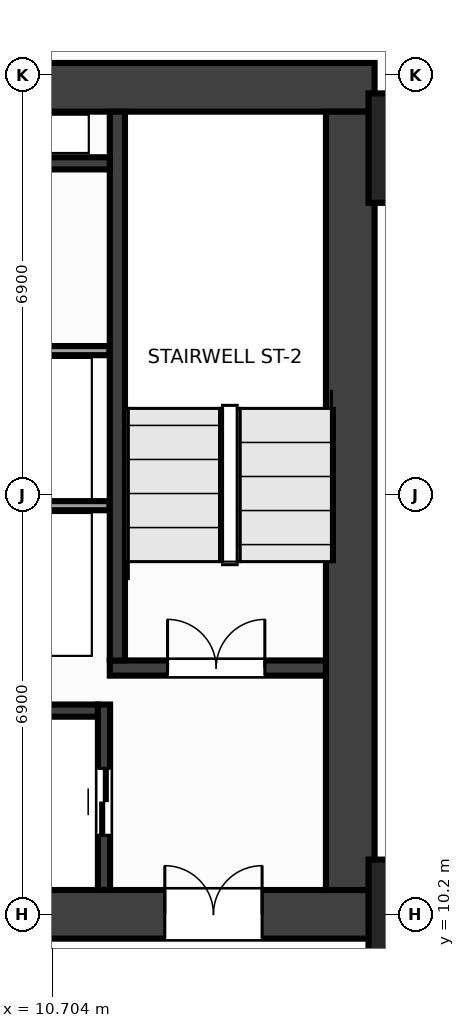
"""IFC4 building model, lengths in metres.
Left out: names, types, materials, properties, quantities, classifications, styles, units other than length and angle.
Written with IfcOpenShell. Run it as: python <this file> out.ifc"""

import sys

from ifc_helpers import new_model, si_unit, direction, frame, frame_2d, origin, origin_2d, place, context, subcontext, project, spatial, rectangle, extrude, source, transform, mapped, element, fill, save


model = new_model("IFC4")
c1 = context("Model", 3, precision=1e-05, world=origin(), true_north=direction((0.0, 1.0)))
c2 = subcontext(c1, "Body", "Model", "MODEL_VIEW")
j1 = project(units=[si_unit("LENGTHUNIT", "METRE"), si_unit("PLANEANGLEUNIT", "RADIAN")], contexts=[c1])
p1 = place(None, origin())
s1 = spatial("IfcSite", under=j1, at=p1, CompositionType="ELEMENT")
p2 = place(p1, origin())
s2 = spatial("IfcBuilding", under=s1, at=p2, CompositionType="ELEMENT")
p3 = place(p2, frame((0.0, 0.0, 41.6)))
s3 = spatial("IfcBuildingStorey", under=s2, at=p3, CompositionType="ELEMENT", Elevation=41.6)
m1 = source(origin(), c2, "Body", "SweptSolid", [
    extrude(rectangle(XDim=32.0, YDim=0.8, at=frame_2d((16.0, 0.0))), origin(), (0.0, 0.0, 1.0), 3.6),
])
p4 = place(p3, frame((-16.0, 23.8, 0.0), z_axis=(0.0, 0.0, 1.0), x_axis=(1.0, 0.0, 0.0)))
e1 = element("IfcWall", 1, at=p4, inside=s3, PredefinedType="SHEAR", context=c2, shape_type="MappedRepresentation", body=[
    mapped(m1, transform((0.0, 0.0, 0.0), x_axis=(1.0, 0.0, 0.0), y_axis=(0.0, 1.0, 0.0), z_axis=(0.0, 0.0, 1.0), scale=1.0)),
])
p5 = place(p3, frame((-16.0, 10.2, 0.0), z_axis=(0.0, 0.0, 1.0), x_axis=(1.0, 0.0, 0.0)))
e2 = element("IfcWall", 2, at=p5, inside=s3, PredefinedType="SHEAR", context=c2, shape_type="MappedRepresentation", body=[
    mapped(m1, transform((0.0, 0.0, 0.0), x_axis=(1.0, 0.0, 0.0), y_axis=(0.0, 1.0, 0.0), z_axis=(0.0, 0.0, 1.0), scale=1.0)),
])
p6 = place(p5, frame((1.85, 0.0, 0.0)))
e3 = element("IfcOpeningElement", 3, at=p6, cuts=e2, PredefinedType="OPENING", context=c2, shape_type="SweptSolid", body=[
    extrude(rectangle(XDim=1.6, YDim=2.15, at=frame_2d((0.8, 1.075))), frame((0.0, 0.412, 0.0), z_axis=(0.0, -1.0, 0.0), x_axis=(1.0, 0.0, 0.0)), (0.0, 0.0, 1.0), 0.824),
])
p7 = place(p5, frame((28.55, 0.0, 0.0)))
e4 = element("IfcOpeningElement", 4, at=p7, cuts=e2, PredefinedType="OPENING", context=c2, shape_type="SweptSolid", body=[
    extrude(rectangle(XDim=1.6, YDim=2.15, at=frame_2d((0.8, 1.075))), frame((0.0, 0.412, 0.0), z_axis=(0.0, -1.0, 0.0), x_axis=(1.0, 0.0, 0.0)), (0.0, 0.0, 1.0), 0.824),
])
p8 = place(p5, frame((15.25, 0.0, 0.0)))
e5 = element("IfcOpeningElement", 5, at=p8, cuts=e2, PredefinedType="OPENING", context=c2, shape_type="SweptSolid", body=[
    extrude(rectangle(XDim=1.5, YDim=2.2, at=frame_2d((0.75, 1.1))), frame((0.0, 0.412, 0.0), z_axis=(0.0, -1.0, 0.0), x_axis=(1.0, 0.0, 0.0)), (0.0, 0.0, 1.0), 0.824),
])
m2 = source(origin(), c2, "Body", "SweptSolid", [
    extrude(rectangle(XDim=12.8, YDim=0.8, at=frame_2d((6.4, 0.0))), origin(), (0.0, 0.0, 1.0), 3.6),
])
p9 = place(p3, frame((15.6, 10.6, 0.0), z_axis=(0.0, 0.0, 1.0), x_axis=(0.0, 1.0, 0.0)))
e6 = element("IfcWall", 6, at=p9, inside=s3, PredefinedType="SHEAR", context=c2, shape_type="MappedRepresentation", body=[
    mapped(m2, transform((0.0, 0.0, 0.0), x_axis=(1.0, 0.0, 0.0), y_axis=(0.0, 1.0, 0.0), z_axis=(0.0, 0.0, 1.0), scale=1.0)),
])
m3 = source(origin(), c2, "Body", "SweptSolid", [
    extrude(rectangle(XDim=3.555, YDim=0.25, at=frame_2d((1.777, 0.0))), origin(), (0.0, 0.0, 1.0), 3.6),
])
p10 = place(p3, frame((11.645, 14.25, 0.0), z_axis=(0.0, 0.0, 1.0), x_axis=(1.0, 0.0, 0.0)))
e7 = element("IfcWall", 7, at=p10, inside=s3, PredefinedType="SHEAR", context=c2, shape_type="MappedRepresentation", body=[
    mapped(m3, transform((0.0, 0.0, 0.0), x_axis=(1.0, 0.0, 0.0), y_axis=(0.0, 1.0, 0.0), z_axis=(0.0, 0.0, 1.0), scale=1.0)),
])
p11 = place(p10, frame((0.95, 0.0, 0.0)))
e8 = element("IfcOpeningElement", 8, at=p11, cuts=e7, PredefinedType="OPENING", context=c2, shape_type="SweptSolid", body=[
    extrude(rectangle(XDim=1.6, YDim=2.15, at=frame_2d((0.8, 1.075))), frame((0.0, 0.137, 0.0), z_axis=(0.0, -1.0, 0.0), x_axis=(1.0, 0.0, 0.0)), (0.0, 0.0, 1.0), 0.274),
])
m4 = source(origin(), c2, "Body", "SweptSolid", [
    extrude(rectangle(XDim=9.025, YDim=0.25, at=frame_2d((4.512, 0.0))), origin(), (0.0, 0.0, 1.0), 3.6),
])
p12 = place(p3, frame((11.77, 14.375, 0.0), z_axis=(0.0, 0.0, 1.0), x_axis=(0.0, 1.0, 0.0)))
e9 = element("IfcWall", 9, at=p12, inside=s3, PredefinedType="SHEAR", context=c2, shape_type="MappedRepresentation", body=[
    mapped(m4, transform((0.0, 0.0, 0.0), x_axis=(1.0, 0.0, 0.0), y_axis=(0.0, 1.0, 0.0), z_axis=(0.0, 0.0, 1.0), scale=1.0)),
])
m5 = source(origin(), c2, "Body", "SweptSolid", [
    extrude(rectangle(XDim=3.05, YDim=0.2, at=frame_2d((1.525, 0.0))), origin(), (0.0, 0.0, 1.0), 3.6),
])
p13 = place(p3, frame((11.55, 10.6, 0.0), z_axis=(0.0, 0.0, 1.0), x_axis=(0.0, 1.0, 0.0)))
e10 = element("IfcWall", 10, at=p13, inside=s3, PredefinedType="SHEAR", context=c2, shape_type="MappedRepresentation", body=[
    mapped(m5, transform((0.0, 0.0, 0.0), x_axis=(1.0, 0.0, 0.0), y_axis=(0.0, 1.0, 0.0), z_axis=(0.0, 0.0, 1.0), scale=1.0)),
])
p14 = place(p13, frame((0.9, 0.0, 0.0)))
e11 = element("IfcOpeningElement", 11, at=p14, cuts=e10, PredefinedType="OPENING", context=c2, shape_type="SweptSolid", body=[
    extrude(rectangle(XDim=1.1, YDim=2.15, at=frame_2d((0.55, 1.075))), frame((0.0, 0.112, 0.0), z_axis=(0.0, -1.0, 0.0), x_axis=(1.0, 0.0, 0.0)), (0.0, 0.0, 1.0), 0.224),
])
m6 = source(origin(), c2, "Body", "SweptSolid", [
    extrude(rectangle(XDim=2.825, YDim=0.2, at=frame_2d((1.413, 0.0))), origin(), (0.0, 0.0, 1.0), 3.6),
])
p15 = place(p3, frame((8.625, 13.55, 0.0), z_axis=(0.0, 0.0, 1.0), x_axis=(1.0, 0.0, 0.0)))
e12 = element("IfcWall", 12, at=p15, inside=s3, PredefinedType="SHEAR", context=c2, shape_type="MappedRepresentation", body=[
    mapped(m6, transform((0.0, 0.0, 0.0), x_axis=(1.0, 0.0, 0.0), y_axis=(0.0, 1.0, 0.0), z_axis=(0.0, 0.0, 1.0), scale=1.0)),
])
m7 = source(origin(), c2, "Body", "SweptSolid", [
    extrude(rectangle(XDim=3.02, YDim=0.2, at=frame_2d((1.51, 0.0))), origin(), (0.0, 0.0, 1.0), 3.6),
])
p16 = place(p3, frame((8.625, 22.55, 0.0), z_axis=(0.0, 0.0, 1.0), x_axis=(1.0, 0.0, 0.0)))
e13 = element("IfcWall", 13, at=p16, inside=s3, PredefinedType="SHEAR", context=c2, shape_type="MappedRepresentation", body=[
    mapped(m7, transform((0.0, 0.0, 0.0), x_axis=(1.0, 0.0, 0.0), y_axis=(0.0, 1.0, 0.0), z_axis=(0.0, 0.0, 1.0), scale=1.0)),
])
m8 = source(origin(), c2, "Body", "SweptSolid", [
    extrude(rectangle(XDim=1.8, YDim=1.8, at=origin_2d()), origin(), (0.0, 0.0, 1.0), 3.6),
])
for number, where, z_axis, x_axis in (
    (14, (16.8, 10.2, 0.0), (0.0, 0.0, 1.0), (1.0, 0.0, 0.0)),
    (15, (16.8, 22.8, 0.0), (0.0, 0.0, 1.0), (1.0, 0.0, 0.0)),
):
    element("IfcColumn", number, at=place(p3, frame(where, z_axis=z_axis, x_axis=x_axis)), inside=s3, PredefinedType="COLUMN", context=c2, shape_type="MappedRepresentation", body=[
        mapped(m8, transform((0.0, 0.0, 0.0), x_axis=(1.0, 0.0, 0.0), y_axis=(0.0, 1.0, 0.0), z_axis=(0.0, 0.0, 1.0), scale=1.0)),
    ])
m9 = source(origin(), c2, "Body", "SweptSolid", [
    extrude(rectangle(XDim=3.01, YDim=0.15, at=frame_2d((1.505, 0.0))), origin(), (0.0, 0.0, 1.0), 3.36),
])
for number, where, z_axis, x_axis in (
    (16, (8.63, 16.92, 0.0), (0.0, 0.0, 1.0), (1.0, 0.0, 0.0)),
    (17, (8.63, 19.47, 0.0), (0.0, 0.0, 1.0), (1.0, 0.0, 0.0)),
):
    element("IfcWall", number, at=place(p3, frame(where, z_axis=z_axis, x_axis=x_axis)), inside=s3, PredefinedType="PARTITIONING", context=c2, shape_type="MappedRepresentation", body=[
        mapped(m9, transform((0.0, 0.0, 0.0), x_axis=(1.0, 0.0, 0.0), y_axis=(0.0, 1.0, 0.0), z_axis=(0.0, 0.0, 1.0), scale=1.0)),
    ])
m10 = source(origin(), c2, "Body", "SweptSolid", [
    extrude(rectangle(XDim=1.6, YDim=2.15, at=frame_2d((0.8, 1.075))), frame((0.0, 0.025, 0.0), z_axis=(0.0, -1.0, 0.0), x_axis=(1.0, 0.0, 0.0)), (0.0, 0.0, 1.0), 0.05),
])
p17 = place(p11, origin())
e18 = element("IfcDoor", 18, at=p17, inside=s3, OperationType="DOUBLE_DOOR_SINGLE_SWING", PredefinedType="DOOR", context=c2, shape_type="MappedRepresentation", body=[
    mapped(m10, transform((0.0, 0.0, 0.0), x_axis=(1.0, 0.0, 0.0), y_axis=(0.0, 1.0, 0.0), z_axis=(0.0, 0.0, 1.0), scale=1.0)),
])
fill(e8, e18)
p18 = place(p7, origin())
e19 = element("IfcDoor", 19, at=p18, inside=s3, OperationType="DOUBLE_DOOR_SINGLE_SWING", PredefinedType="DOOR", context=c2, shape_type="MappedRepresentation", body=[
    mapped(m10, transform((0.0, 0.0, 0.0), x_axis=(1.0, 0.0, 0.0), y_axis=(0.0, 1.0, 0.0), z_axis=(0.0, 0.0, 1.0), scale=1.0)),
])
fill(e4, e19)
m11 = source(origin(), c2, "Body", "SweptSolid", [
    extrude(rectangle(XDim=1.1, YDim=2.15, at=frame_2d((0.55, 1.075))), frame((0.0, 0.025, 0.0), z_axis=(0.0, -1.0, 0.0), x_axis=(1.0, 0.0, 0.0)), (0.0, 0.0, 1.0), 0.05),
])
p19 = place(p14, origin())
e20 = element("IfcDoor", 20, at=p19, inside=s3, OperationType="DOUBLE_DOOR_SLIDING", PredefinedType="DOOR", context=c2, shape_type="MappedRepresentation", body=[
    mapped(m11, transform((0.0, 0.0, 0.0), x_axis=(1.0, 0.0, 0.0), y_axis=(0.0, 1.0, 0.0), z_axis=(0.0, 0.0, 1.0), scale=1.0)),
])
fill(e11, e20)
save(model, sys.argv[1])
